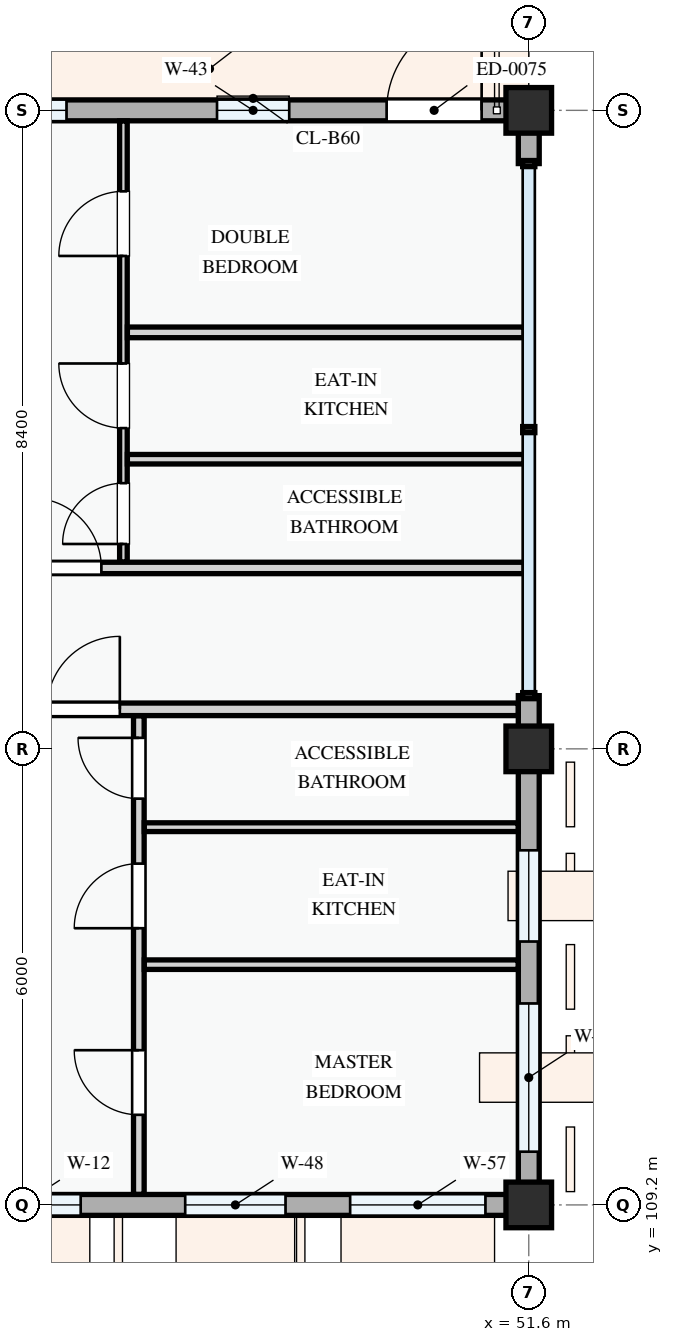
"""IFC4 building model, lengths in metres.
Left out: names, types, materials, properties, quantities, classifications, styles, units other than length and angle.
Written with IfcOpenShell. Run it as: python <this file> out.ifc"""

import sys

from ifc_helpers import new_model, si_unit, direction, frame, frame_2d, origin, origin_2d, place, context, subcontext, project, spatial, rectangle, extrude, element, fill, save


model = new_model("IFC4")
c1 = context("Model", 3, precision=1e-05, world=origin(), true_north=direction((0.0, 1.0)))
c2 = subcontext(c1, "Body", "Model", "MODEL_VIEW")
j1 = project(units=[si_unit("LENGTHUNIT", "METRE"), si_unit("PLANEANGLEUNIT", "RADIAN")], contexts=[c1])
p1 = place(None, origin())
s1 = spatial("IfcSite", under=j1, at=p1, CompositionType="ELEMENT")
p2 = place(p1, origin())
s2 = spatial("IfcBuilding", under=s1, at=p2, CompositionType="ELEMENT")
p3 = place(p2, frame((0.0, 0.0, 31.2)))
s3 = spatial("IfcBuildingStorey", under=s2, at=p3, CompositionType="ELEMENT", Elevation=31.2)
for number, where, z_axis, x_axis in (
    (1, (51.6, 109.2, 0.0), (0.0, 0.0, 1.0), (1.0, 0.0, 0.0)),
    (2, (51.6, 115.2, 0.0), (0.0, 0.0, 1.0), (1.0, 0.0, 0.0)),
    (3, (51.6, 123.6, 0.0), (0.0, 0.0, 1.0), (1.0, 0.0, 0.0)),
):
    element("IfcColumn", number, at=place(p3, frame(where, z_axis=z_axis, x_axis=x_axis)), inside=s3, PredefinedType="COLUMN", context=c2, shape_type="SweptSolid", body=[
        extrude(rectangle(XDim=0.6, YDim=0.6, at=origin_2d()), origin(), (0.0, 0.0, 1.0), 3.3),
    ])
p4 = place(p3, frame((43.2, 109.2, 0.0), z_axis=(0.0, 0.0, 1.0), x_axis=(1.0, 0.0, 0.0)))
e4 = element("IfcWall", 4, at=p4, inside=s3, PredefinedType="STANDARD", context=c2, shape_type="SweptSolid", body=[
    extrude(rectangle(XDim=8.4, YDim=0.275, at=frame_2d((4.2, 0.0))), origin(), (0.0, 0.0, 1.0), 2.375),
])
p5 = place(p4, frame((0.955, 0.0, 0.78)))
e5 = element("IfcOpeningElement", 5, at=p5, cuts=e4, PredefinedType="OPENING", context=c2, shape_type="SweptSolid", body=[
    extrude(rectangle(XDim=1.55, YDim=1.4, at=frame_2d((0.775, 0.7))), frame((0.0, 0.147, 0.0), z_axis=(0.0, -1.0, 0.0), x_axis=(1.0, 0.0, 0.0)), (0.0, 0.0, 1.0), 0.295),
])
p6 = place(p4, frame((3.88, 0.0, 0.78)))
e6 = element("IfcOpeningElement", 6, at=p6, cuts=e4, PredefinedType="OPENING", context=c2, shape_type="SweptSolid", body=[
    extrude(rectangle(XDim=1.32, YDim=1.35, at=frame_2d((0.66, 0.675))), frame((0.0, 0.147, 0.0), z_axis=(0.0, -1.0, 0.0), x_axis=(1.0, 0.0, 0.0)), (0.0, 0.0, 1.0), 0.295),
])
p7 = place(p4, frame((6.05, 0.0, 0.78)))
e7 = element("IfcOpeningElement", 7, at=p7, cuts=e4, PredefinedType="OPENING", context=c2, shape_type="SweptSolid", body=[
    extrude(rectangle(XDim=1.78, YDim=1.42, at=frame_2d((0.89, 0.71))), frame((0.0, 0.147, 0.0), z_axis=(0.0, -1.0, 0.0), x_axis=(1.0, 0.0, 0.0)), (0.0, 0.0, 1.0), 0.295),
])
p8 = place(p3, frame((51.6, 109.2, 0.0), z_axis=(0.0, 0.0, 1.0), x_axis=(0.0, 1.0, 0.0)))
e8 = element("IfcWall", 8, at=p8, inside=s3, PredefinedType="STANDARD", context=c2, shape_type="SweptSolid", body=[
    extrude(rectangle(XDim=6.0, YDim=0.275, at=frame_2d((3.0, 0.0))), origin(), (0.0, 0.0, 1.0), 2.575),
])
p9 = place(p8, frame((0.7, 0.0, 0.78)))
e9 = element("IfcOpeningElement", 9, at=p9, cuts=e8, PredefinedType="OPENING", context=c2, shape_type="SweptSolid", body=[
    extrude(rectangle(XDim=1.95, YDim=1.65, at=frame_2d((0.975, 0.825))), frame((0.0, 0.147, 0.0), z_axis=(0.0, -1.0, 0.0), x_axis=(1.0, 0.0, 0.0)), (0.0, 0.0, 1.0), 0.295),
])
p10 = place(p8, frame((3.465, 0.0, 0.78)))
e10 = element("IfcOpeningElement", 10, at=p10, cuts=e8, PredefinedType="OPENING", context=c2, shape_type="SweptSolid", body=[
    extrude(rectangle(XDim=1.2, YDim=1.5, at=frame_2d((0.6, 0.75))), frame((0.0, 0.147, 0.0), z_axis=(0.0, -1.0, 0.0), x_axis=(1.0, 0.0, 0.0)), (0.0, 0.0, 1.0), 0.295),
])
p11 = place(p3, frame((51.6, 115.2, 0.0), z_axis=(0.0, 0.0, 1.0), x_axis=(0.0, 1.0, 0.0)))
e11 = element("IfcWall", 11, at=p11, inside=s3, PredefinedType="STANDARD", context=c2, shape_type="SweptSolid", body=[
    extrude(rectangle(XDim=0.7, YDim=0.275, at=frame_2d((0.35, 0.0))), origin(), (0.0, 0.0, 1.0), 2.425),
])
p12 = place(p3, frame((51.6, 122.9, 0.0), z_axis=(0.0, 0.0, 1.0), x_axis=(0.0, 1.0, 0.0)))
e12 = element("IfcWall", 12, at=p12, inside=s3, PredefinedType="STANDARD", context=c2, shape_type="SweptSolid", body=[
    extrude(rectangle(XDim=0.561, YDim=0.275, at=frame_2d((0.28, 0.0))), origin(), (0.0, 0.0, 1.0), 2.425),
])
p13 = place(p3, frame((51.6, 123.6, 0.0), z_axis=(0.0, 0.0, 1.0), x_axis=(-1.0, 0.0, 0.0)))
e13 = element("IfcWall", 13, at=p13, inside=s3, PredefinedType="STANDARD", context=c2, shape_type="SweptSolid", body=[
    extrude(rectangle(XDim=8.4, YDim=0.275, at=frame_2d((4.2, 0.0))), origin(), (0.0, 0.0, 1.0), 2.375),
])
p14 = place(p13, frame((0.62, 0.0, 0.0)))
e14 = element("IfcOpeningElement", 14, at=p14, cuts=e13, PredefinedType="OPENING", context=c2, shape_type="SweptSolid", body=[
    extrude(rectangle(XDim=1.25, YDim=2.2, at=frame_2d((0.625, 1.1))), frame((0.0, 0.147, 0.0), z_axis=(0.0, -1.0, 0.0), x_axis=(1.0, 0.0, 0.0)), (0.0, 0.0, 1.0), 0.295),
])
p15 = place(p13, frame((3.151, 0.0, 0.78)))
e15 = element("IfcOpeningElement", 15, at=p15, cuts=e13, PredefinedType="OPENING", context=c2, shape_type="SweptSolid", body=[
    extrude(rectangle(XDim=0.95, YDim=1.15, at=frame_2d((0.475, 0.575))), frame((0.0, 0.147, 0.0), z_axis=(0.0, -1.0, 0.0), x_axis=(1.0, 0.0, 0.0)), (0.0, 0.0, 1.0), 0.295),
])
p16 = place(p13, frame((6.081, 0.0, 0.78)))
e16 = element("IfcOpeningElement", 16, at=p16, cuts=e13, PredefinedType="OPENING", context=c2, shape_type="SweptSolid", body=[
    extrude(rectangle(XDim=1.38, YDim=1.48, at=frame_2d((0.69, 0.74))), frame((0.0, 0.147, 0.0), z_axis=(0.0, -1.0, 0.0), x_axis=(1.0, 0.0, 0.0)), (0.0, 0.0, 1.0), 0.295),
])
p17 = place(p3, frame((46.47, 109.34, 0.0), z_axis=(0.0, 0.0, 1.0), x_axis=(0.0, 1.0, 0.0)))
e17 = element("IfcWall", 17, at=p17, inside=s3, PredefinedType="PARTITIONING", context=c2, shape_type="SweptSolid", body=[
    extrude(rectangle(XDim=6.296, YDim=0.14, at=frame_2d((3.148, 0.0))), origin(), (0.0, 0.0, 1.0), 3.0),
])
p18 = place(p17, frame((1.046, 0.0, 0.0)))
e18 = element("IfcOpeningElement", 18, at=p18, cuts=e17, PredefinedType="OPENING", context=c2, shape_type="SweptSolid", body=[
    extrude(rectangle(XDim=0.85, YDim=2.1, at=frame_2d((0.425, 1.05))), frame((0.0, 0.08, 0.0), z_axis=(0.0, -1.0, 0.0), x_axis=(1.0, 0.0, 0.0)), (0.0, 0.0, 1.0), 0.16),
])
p19 = place(p17, frame((3.501, 0.0, 0.0)))
e19 = element("IfcOpeningElement", 19, at=p19, cuts=e17, PredefinedType="OPENING", context=c2, shape_type="SweptSolid", body=[
    extrude(rectangle(XDim=0.85, YDim=2.1, at=frame_2d((0.425, 1.05))), frame((0.0, 0.08, 0.0), z_axis=(0.0, -1.0, 0.0), x_axis=(1.0, 0.0, 0.0)), (0.0, 0.0, 1.0), 0.16),
])
p20 = place(p17, frame((5.205, 0.0, 0.0)))
e20 = element("IfcOpeningElement", 20, at=p20, cuts=e17, PredefinedType="OPENING", context=c2, shape_type="SweptSolid", body=[
    extrude(rectangle(XDim=0.8, YDim=2.1, at=frame_2d((0.4, 1.05))), frame((0.0, 0.08, 0.0), z_axis=(0.0, -1.0, 0.0), x_axis=(1.0, 0.0, 0.0)), (0.0, 0.0, 1.0), 0.16),
])
p21 = place(p3, frame((46.542, 112.361, 0.0), z_axis=(0.0, 0.0, 1.0), x_axis=(1.0, 0.0, 0.0)))
e21 = element("IfcWall", 21, at=p21, inside=s3, PredefinedType="PARTITIONING", context=c2, shape_type="SweptSolid", body=[
    extrude(rectangle(XDim=4.918, YDim=0.125, at=frame_2d((2.459, 0.0))), origin(), (0.0, 0.0, 1.0), 3.0),
])
p22 = place(p3, frame((46.542, 114.17, 0.0), z_axis=(0.0, 0.0, 1.0), x_axis=(1.0, 0.0, 0.0)))
e22 = element("IfcWall", 22, at=p22, inside=s3, PredefinedType="PARTITIONING", context=c2, shape_type="SweptSolid", body=[
    extrude(rectangle(XDim=4.918, YDim=0.115, at=frame_2d((2.459, 0.0))), origin(), (0.0, 0.0, 1.0), 3.0),
])
p23 = place(p3, frame((46.267, 117.657, 0.0), z_axis=(0.0, 0.0, 1.0), x_axis=(0.0, 1.0, 0.0)))
e23 = element("IfcWall", 23, at=p23, inside=s3, PredefinedType="PARTITIONING", context=c2, shape_type="SweptSolid", body=[
    extrude(rectangle(XDim=5.803, YDim=0.1, at=frame_2d((2.902, 0.0))), origin(), (0.0, 0.0, 1.0), 3.0),
])
p24 = place(p23, frame((0.238, 0.0, 0.0)))
e24 = element("IfcOpeningElement", 24, at=p24, cuts=e23, PredefinedType="OPENING", context=c2, shape_type="SweptSolid", body=[
    extrude(rectangle(XDim=0.8, YDim=2.1, at=frame_2d((0.4, 1.05))), frame((0.0, 0.06, 0.0), z_axis=(0.0, -1.0, 0.0), x_axis=(1.0, 0.0, 0.0)), (0.0, 0.0, 1.0), 0.12),
])
p25 = place(p23, frame((1.763, 0.0, 0.0)))
e25 = element("IfcOpeningElement", 25, at=p25, cuts=e23, PredefinedType="OPENING", context=c2, shape_type="SweptSolid", body=[
    extrude(rectangle(XDim=0.85, YDim=2.1, at=frame_2d((0.425, 1.05))), frame((0.0, 0.06, 0.0), z_axis=(0.0, -1.0, 0.0), x_axis=(1.0, 0.0, 0.0)), (0.0, 0.0, 1.0), 0.12),
])
p26 = place(p23, frame((4.028, 0.0, 0.0)))
e26 = element("IfcOpeningElement", 26, at=p26, cuts=e23, PredefinedType="OPENING", context=c2, shape_type="SweptSolid", body=[
    extrude(rectangle(XDim=0.85, YDim=2.1, at=frame_2d((0.425, 1.05))), frame((0.0, 0.06, 0.0), z_axis=(0.0, -1.0, 0.0), x_axis=(1.0, 0.0, 0.0)), (0.0, 0.0, 1.0), 0.12),
])
p27 = place(p3, frame((46.319, 120.679, 0.0), z_axis=(0.0, 0.0, 1.0), x_axis=(1.0, 0.0, 0.0)))
e27 = element("IfcWall", 27, at=p27, inside=s3, PredefinedType="PARTITIONING", context=c2, shape_type="SweptSolid", body=[
    extrude(rectangle(XDim=5.221, YDim=0.14, at=frame_2d((2.61, 0.0))), origin(), (0.0, 0.0, 1.0), 3.0),
])
p28 = place(p3, frame((46.319, 119.01, 0.0), z_axis=(0.0, 0.0, 1.0), x_axis=(1.0, 0.0, 0.0)))
e28 = element("IfcWall", 28, at=p28, inside=s3, PredefinedType="PARTITIONING", context=c2, shape_type="SweptSolid", body=[
    extrude(rectangle(XDim=5.221, YDim=0.125, at=frame_2d((2.61, 0.0))), origin(), (0.0, 0.0, 1.0), 3.0),
])
p29 = place(p3, frame((25.15, 115.72, 0.0), z_axis=(0.0, 0.0, 1.0), x_axis=(1.0, 0.0, 0.0)))
e29 = element("IfcWall", 29, at=p29, inside=s3, PredefinedType="PARTITIONING", context=c2, shape_type="SweptSolid", body=[
    extrude(rectangle(XDim=26.311, YDim=0.165, at=frame_2d((13.155, 0.0))), origin(), (0.0, 0.0, 1.0), 3.0),
])
p30 = place(p29, frame((0.25, 0.0, 0.0)))
e30 = element("IfcOpeningElement", 30, at=p30, cuts=e29, PredefinedType="OPENING", context=c2, shape_type="SweptSolid", body=[
    extrude(rectangle(XDim=0.92, YDim=2.1, at=frame_2d((0.46, 1.05))), frame((0.0, 0.093, 0.0), z_axis=(0.0, -1.0, 0.0), x_axis=(1.0, 0.0, 0.0)), (0.0, 0.0, 1.0), 0.185),
])
p31 = place(p29, frame((9.22, 0.0, 0.0)))
e31 = element("IfcOpeningElement", 31, at=p31, cuts=e29, PredefinedType="OPENING", context=c2, shape_type="SweptSolid", body=[
    extrude(rectangle(XDim=0.92, YDim=2.1, at=frame_2d((0.46, 1.05))), frame((0.0, 0.093, 0.0), z_axis=(0.0, -1.0, 0.0), x_axis=(1.0, 0.0, 0.0)), (0.0, 0.0, 1.0), 0.185),
])
p32 = place(p29, frame((20.11, 0.0, 0.0)))
e32 = element("IfcOpeningElement", 32, at=p32, cuts=e29, PredefinedType="OPENING", context=c2, shape_type="SweptSolid", body=[
    extrude(rectangle(XDim=0.96, YDim=2.12, at=frame_2d((0.48, 1.06))), frame((0.0, 0.093, 0.0), z_axis=(0.0, -1.0, 0.0), x_axis=(1.0, 0.0, 0.0)), (0.0, 0.0, 1.0), 0.185),
])
p33 = place(p3, frame((22.66, 117.58, 0.0), z_axis=(0.0, 0.0, 1.0), x_axis=(1.0, 0.0, 0.0)))
e33 = element("IfcWall", 33, at=p33, inside=s3, PredefinedType="PARTITIONING", context=c2, shape_type="SweptSolid", body=[
    extrude(rectangle(XDim=28.88, YDim=0.15, at=frame_2d((14.44, 0.0))), origin(), (0.0, 0.0, 1.0), 3.0),
])
p34 = place(p33, frame((2.74, 0.0, 0.0)))
e34 = element("IfcOpeningElement", 34, at=p34, cuts=e33, PredefinedType="OPENING", context=c2, shape_type="SweptSolid", body=[
    extrude(rectangle(XDim=0.92, YDim=2.1, at=frame_2d((0.46, 1.05))), frame((0.0, 0.085, 0.0), z_axis=(0.0, -1.0, 0.0), x_axis=(1.0, 0.0, 0.0)), (0.0, 0.0, 1.0), 0.17),
])
p35 = place(p33, frame((11.71, 0.0, 0.0)))
e35 = element("IfcOpeningElement", 35, at=p35, cuts=e33, PredefinedType="OPENING", context=c2, shape_type="SweptSolid", body=[
    extrude(rectangle(XDim=0.92, YDim=2.1, at=frame_2d((0.46, 1.05))), frame((0.0, 0.085, 0.0), z_axis=(0.0, -1.0, 0.0), x_axis=(1.0, 0.0, 0.0)), (0.0, 0.0, 1.0), 0.17),
])
p36 = place(p33, frame((22.397, 0.0, 0.0)))
e36 = element("IfcOpeningElement", 36, at=p36, cuts=e33, PredefinedType="OPENING", context=c2, shape_type="SweptSolid", body=[
    extrude(rectangle(XDim=0.92, YDim=2.1, at=frame_2d((0.46, 1.05))), frame((0.0, 0.085, 0.0), z_axis=(0.0, -1.0, 0.0), x_axis=(1.0, 0.0, 0.0)), (0.0, 0.0, 1.0), 0.17),
])
p37 = place(p5, origin())
e37 = element("IfcWindow", 37, at=p37, inside=s3, PartitioningType="SINGLE_PANEL", PredefinedType="WINDOW", context=c2, shape_type="SweptSolid", body=[
    extrude(rectangle(XDim=1.55, YDim=1.4, at=frame_2d((0.775, 0.7))), frame((0.0, 0.03, 0.0), z_axis=(0.0, -1.0, 0.0), x_axis=(1.0, 0.0, 0.0)), (0.0, 0.0, 1.0), 0.06),
])
fill(e5, e37)
p38 = place(p6, origin())
e38 = element("IfcWindow", 38, at=p38, inside=s3, PartitioningType="SINGLE_PANEL", PredefinedType="WINDOW", context=c2, shape_type="SweptSolid", body=[
    extrude(rectangle(XDim=1.32, YDim=1.35, at=frame_2d((0.66, 0.675))), frame((0.0, 0.03, 0.0), z_axis=(0.0, -1.0, 0.0), x_axis=(1.0, 0.0, 0.0)), (0.0, 0.0, 1.0), 0.06),
])
fill(e6, e38)
p39 = place(p7, origin())
e39 = element("IfcWindow", 39, at=p39, inside=s3, PartitioningType="DOUBLE_PANEL_VERTICAL", PredefinedType="WINDOW", context=c2, shape_type="SweptSolid", body=[
    extrude(rectangle(XDim=1.78, YDim=1.42, at=frame_2d((0.89, 0.71))), frame((0.0, 0.03, 0.0), z_axis=(0.0, -1.0, 0.0), x_axis=(1.0, 0.0, 0.0)), (0.0, 0.0, 1.0), 0.06),
])
fill(e7, e39)
p40 = place(p9, origin())
e40 = element("IfcWindow", 40, at=p40, inside=s3, PartitioningType="DOUBLE_PANEL_VERTICAL", PredefinedType="WINDOW", context=c2, shape_type="SweptSolid", body=[
    extrude(rectangle(XDim=1.95, YDim=1.65, at=frame_2d((0.975, 0.825))), frame((0.0, 0.03, 0.0), z_axis=(0.0, -1.0, 0.0), x_axis=(1.0, 0.0, 0.0)), (0.0, 0.0, 1.0), 0.06),
])
fill(e9, e40)
p41 = place(p10, origin())
e41 = element("IfcWindow", 41, at=p41, inside=s3, PartitioningType="SINGLE_PANEL", PredefinedType="WINDOW", context=c2, shape_type="SweptSolid", body=[
    extrude(rectangle(XDim=1.2, YDim=1.5, at=frame_2d((0.6, 0.75))), frame((0.0, 0.03, 0.0), z_axis=(0.0, -1.0, 0.0), x_axis=(1.0, 0.0, 0.0)), (0.0, 0.0, 1.0), 0.06),
])
fill(e10, e41)
p42 = place(p14, frame((1.25, 0.0, 0.0), z_axis=(0.0, 0.0, 1.0), x_axis=(-1.0, 0.0, 0.0)))
e42 = element("IfcDoor", 42, at=p42, inside=s3, OperationType="SINGLE_SWING_RIGHT", PredefinedType="DOOR", context=c2, shape_type="SweptSolid", body=[
    extrude(rectangle(XDim=1.25, YDim=2.2, at=frame_2d((0.625, 1.1))), frame((0.0, 0.025, 0.0), z_axis=(0.0, -1.0, 0.0), x_axis=(1.0, 0.0, 0.0)), (0.0, 0.0, 1.0), 0.05),
])
fill(e14, e42)
p43 = place(p15, origin())
e43 = element("IfcWindow", 43, at=p43, inside=s3, PartitioningType="SINGLE_PANEL", PredefinedType="WINDOW", context=c2, shape_type="SweptSolid", body=[
    extrude(rectangle(XDim=0.95, YDim=1.15, at=frame_2d((0.475, 0.575))), frame((0.0, 0.03, 0.0), z_axis=(0.0, -1.0, 0.0), x_axis=(1.0, 0.0, 0.0)), (0.0, 0.0, 1.0), 0.06),
])
fill(e15, e43)
p44 = place(p16, origin())
e44 = element("IfcWindow", 44, at=p44, inside=s3, PartitioningType="SINGLE_PANEL", PredefinedType="WINDOW", context=c2, shape_type="SweptSolid", body=[
    extrude(rectangle(XDim=1.38, YDim=1.48, at=frame_2d((0.69, 0.74))), frame((0.0, 0.03, 0.0), z_axis=(0.0, -1.0, 0.0), x_axis=(1.0, 0.0, 0.0)), (0.0, 0.0, 1.0), 0.06),
])
fill(e16, e44)
p45 = place(p18, origin())
e45 = element("IfcDoor", 45, at=p45, inside=s3, OperationType="SINGLE_SWING_RIGHT", PredefinedType="DOOR", context=c2, shape_type="SweptSolid", body=[
    extrude(rectangle(XDim=0.85, YDim=2.1, at=frame_2d((0.425, 1.05))), frame((0.0, 0.025, 0.0), z_axis=(0.0, -1.0, 0.0), x_axis=(1.0, 0.0, 0.0)), (0.0, 0.0, 1.0), 0.05),
])
fill(e18, e45)
p46 = place(p19, origin())
e46 = element("IfcDoor", 46, at=p46, inside=s3, OperationType="SINGLE_SWING_LEFT", PredefinedType="DOOR", context=c2, shape_type="SweptSolid", body=[
    extrude(rectangle(XDim=0.85, YDim=2.1, at=frame_2d((0.425, 1.05))), frame((0.0, 0.025, 0.0), z_axis=(0.0, -1.0, 0.0), x_axis=(1.0, 0.0, 0.0)), (0.0, 0.0, 1.0), 0.05),
])
fill(e19, e46)
p47 = place(p20, origin())
e47 = element("IfcDoor", 47, at=p47, inside=s3, OperationType="SINGLE_SWING_RIGHT", PredefinedType="DOOR", context=c2, shape_type="SweptSolid", body=[
    extrude(rectangle(XDim=0.8, YDim=2.1, at=frame_2d((0.4, 1.05))), frame((0.0, 0.025, 0.0), z_axis=(0.0, -1.0, 0.0), x_axis=(1.0, 0.0, 0.0)), (0.0, 0.0, 1.0), 0.05),
])
fill(e20, e47)
p48 = place(p24, origin())
e48 = element("IfcDoor", 48, at=p48, inside=s3, OperationType="SINGLE_SWING_LEFT", PredefinedType="DOOR", context=c2, shape_type="SweptSolid", body=[
    extrude(rectangle(XDim=0.8, YDim=2.1, at=frame_2d((0.4, 1.05))), frame((0.0, 0.025, 0.0), z_axis=(0.0, -1.0, 0.0), x_axis=(1.0, 0.0, 0.0)), (0.0, 0.0, 1.0), 0.05),
])
fill(e24, e48)
p49 = place(p25, origin())
e49 = element("IfcDoor", 49, at=p49, inside=s3, OperationType="SINGLE_SWING_RIGHT", PredefinedType="DOOR", context=c2, shape_type="SweptSolid", body=[
    extrude(rectangle(XDim=0.85, YDim=2.1, at=frame_2d((0.425, 1.05))), frame((0.0, 0.025, 0.0), z_axis=(0.0, -1.0, 0.0), x_axis=(1.0, 0.0, 0.0)), (0.0, 0.0, 1.0), 0.05),
])
fill(e25, e49)
p50 = place(p26, origin())
e50 = element("IfcDoor", 50, at=p50, inside=s3, OperationType="SINGLE_SWING_LEFT", PredefinedType="DOOR", context=c2, shape_type="SweptSolid", body=[
    extrude(rectangle(XDim=0.85, YDim=2.1, at=frame_2d((0.425, 1.05))), frame((0.0, 0.025, 0.0), z_axis=(0.0, -1.0, 0.0), x_axis=(1.0, 0.0, 0.0)), (0.0, 0.0, 1.0), 0.05),
])
fill(e26, e50)
p51 = place(p32, origin())
e51 = element("IfcDoor", 51, at=p51, inside=s3, OperationType="SINGLE_SWING_RIGHT", PredefinedType="DOOR", context=c2, shape_type="SweptSolid", body=[
    extrude(rectangle(XDim=0.96, YDim=2.12, at=frame_2d((0.48, 1.06))), frame((0.0, 0.025, 0.0), z_axis=(0.0, -1.0, 0.0), x_axis=(1.0, 0.0, 0.0)), (0.0, 0.0, 1.0), 0.05),
])
fill(e32, e51)
p52 = place(p36, origin())
e52 = element("IfcDoor", 52, at=p52, inside=s3, OperationType="SINGLE_SWING_LEFT", PredefinedType="DOOR", context=c2, shape_type="SweptSolid", body=[
    extrude(rectangle(XDim=0.92, YDim=2.1, at=frame_2d((0.46, 1.05))), frame((0.0, 0.025, 0.0), z_axis=(0.0, -1.0, 0.0), x_axis=(1.0, 0.0, 0.0)), (0.0, 0.0, 1.0), 0.05),
])
fill(e36, e52)
save(model, sys.argv[1])
